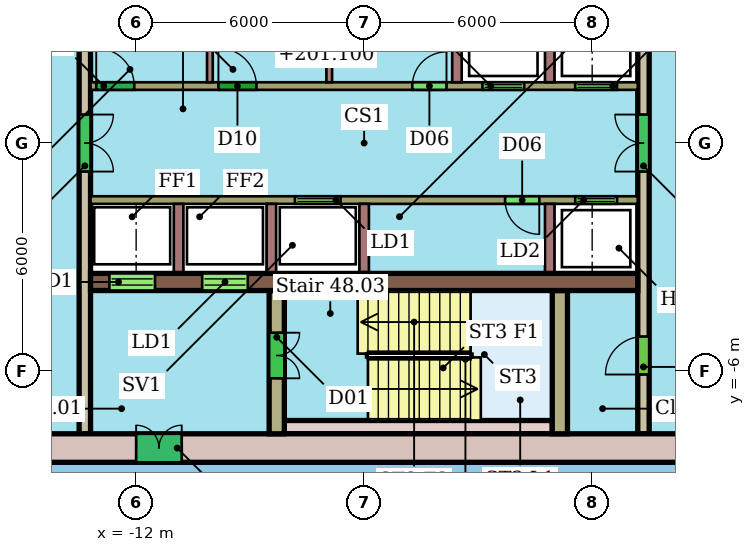
"""IFC4 building model, lengths in metres.
Left out: names, types, materials, properties, quantities, classifications, styles, units other than length and angle.
Written with IfcOpenShell. Run it as: python <this file> out.ifc"""

import sys

from ifc_helpers import new_model, si_unit, direction, frame, frame_2d, origin, place, context, subcontext, project, spatial, rectangle, extrude, element, fill, save


model = new_model("IFC4")
c1 = context("Model", 3, precision=1e-05, world=origin(), true_north=direction((0.0, 1.0)))
c2 = subcontext(c1, "Body", "Model", "MODEL_VIEW")
j1 = project(units=[si_unit("LENGTHUNIT", "METRE"), si_unit("PLANEANGLEUNIT", "RADIAN")], contexts=[c1])
p1 = place(None, origin())
s1 = spatial("IfcSite", under=j1, at=p1, CompositionType="ELEMENT")
p2 = place(p1, origin())
s2 = spatial("IfcBuilding", under=s1, at=p2, CompositionType="ELEMENT")
p3 = place(p2, frame((0.0, 0.0, 199.3)))
s3 = spatial("IfcBuildingStorey", under=s2, at=p3, CompositionType="ELEMENT", Elevation=199.3)
p4 = place(p3, frame((-16.8, -8.025, 0.0), z_axis=(0.0, 0.0, 1.0), x_axis=(1.0, 0.0, 0.0)))
e1 = element("IfcWall", 1, at=p4, inside=s3, PredefinedType="SHEAR", context=c2, shape_type="SweptSolid", body=[
    extrude(rectangle(XDim=21.6, YDim=0.75, at=frame_2d((10.8, 0.0))), origin(), (0.0, 0.0, 1.0), 3.3),
])
p5 = place(p4, frame((4.8, 0.0, 0.0)))
e2 = element("IfcOpeningElement", 2, at=p5, cuts=e1, PredefinedType="OPENING", context=c2, shape_type="SweptSolid", body=[
    extrude(rectangle(XDim=1.2, YDim=2.1, at=frame_2d((0.6, 1.05))), frame((0.0, 0.385, 0.0), z_axis=(0.0, -1.0, 0.0), x_axis=(1.0, 0.0, 0.0)), (0.0, 0.0, 1.0), 0.77),
])
p6 = place(p3, frame((-13.2, -3.655, 0.0), z_axis=(0.0, 0.0, 1.0), x_axis=(1.0, 0.0, 0.0)))
e3 = element("IfcWall", 3, at=p6, inside=s3, PredefinedType="SHEAR", context=c2, shape_type="SweptSolid", body=[
    extrude(rectangle(XDim=7.2, YDim=0.45, at=frame_2d((3.6, 0.0))), origin(), (0.0, 0.0, 1.0), 3.3),
])
p7 = place(p6, frame((0.496, 0.0, 0.0)))
e4 = element("IfcOpeningElement", 4, at=p7, cuts=e3, PredefinedType="OPENING", context=c2, shape_type="SweptSolid", body=[
    extrude(rectangle(XDim=1.2, YDim=2.1, at=frame_2d((0.6, 1.05))), frame((0.0, 0.235, 0.0), z_axis=(0.0, -1.0, 0.0), x_axis=(1.0, 0.0, 0.0)), (0.0, 0.0, 1.0), 0.47),
])
p8 = place(p6, frame((2.938, 0.0, 0.0)))
e5 = element("IfcOpeningElement", 5, at=p8, cuts=e3, PredefinedType="OPENING", context=c2, shape_type="SweptSolid", body=[
    extrude(rectangle(XDim=1.2, YDim=2.1, at=frame_2d((0.6, 1.05))), frame((0.0, 0.235, 0.0), z_axis=(0.0, -1.0, 0.0), x_axis=(1.0, 0.0, 0.0)), (0.0, 0.0, 1.0), 0.47),
])
p9 = place(p3, frame((-6.0, -3.655, 0.0), z_axis=(0.0, 0.0, 1.0), x_axis=(1.0, 0.0, 0.0)))
e6 = element("IfcWall", 6, at=p9, inside=s3, PredefinedType="SHEAR", context=c2, shape_type="SweptSolid", body=[
    extrude(rectangle(XDim=7.2, YDim=0.45, at=frame_2d((3.6, 0.0))), origin(), (0.0, 0.0, 1.0), 3.3),
])
p10 = place(p3, frame((-13.35, 7.65, 0.0), z_axis=(0.0, 0.0, 1.0), x_axis=(0.0, -1.0, 0.0)))
e7 = element("IfcWall", 7, at=p10, inside=s3, PredefinedType="SHEAR", context=c2, shape_type="SweptSolid", body=[
    extrude(rectangle(XDim=15.3, YDim=0.3, at=frame_2d((7.65, 0.0))), origin(), (0.0, 0.0, 1.0), 3.3),
])
p11 = place(p10, frame((6.9, 0.0, 0.0)))
e8 = element("IfcOpeningElement", 8, at=p11, cuts=e7, PredefinedType="OPENING", context=c2, shape_type="SweptSolid", body=[
    extrude(rectangle(XDim=1.5, YDim=2.1, at=frame_2d((0.75, 1.05))), frame((0.0, 0.16, 0.0), z_axis=(0.0, -1.0, 0.0), x_axis=(1.0, 0.0, 0.0)), (0.0, 0.0, 1.0), 0.32),
])
p12 = place(p3, frame((1.35, -7.65, 0.0), z_axis=(0.0, 0.0, 1.0), x_axis=(0.0, 1.0, 0.0)))
e9 = element("IfcWall", 9, at=p12, inside=s3, PredefinedType="SHEAR", context=c2, shape_type="SweptSolid", body=[
    extrude(rectangle(XDim=15.3, YDim=0.3, at=frame_2d((7.65, 0.0))), origin(), (0.0, 0.0, 1.0), 3.3),
])
p13 = place(p12, frame((1.56, 0.0, 0.0)))
e10 = element("IfcOpeningElement", 10, at=p13, cuts=e9, PredefinedType="OPENING", context=c2, shape_type="SweptSolid", body=[
    extrude(rectangle(XDim=1.0, YDim=2.1, at=frame_2d((0.5, 1.05))), frame((0.0, 0.16, 0.0), z_axis=(0.0, -1.0, 0.0), x_axis=(1.0, 0.0, 0.0)), (0.0, 0.0, 1.0), 0.32),
])
p14 = place(p12, frame((6.9, 0.0, 0.0)))
e11 = element("IfcOpeningElement", 11, at=p14, cuts=e9, PredefinedType="OPENING", context=c2, shape_type="SweptSolid", body=[
    extrude(rectangle(XDim=1.5, YDim=2.1, at=frame_2d((0.75, 1.05))), frame((0.0, 0.16, 0.0), z_axis=(0.0, -1.0, 0.0), x_axis=(1.0, 0.0, 0.0)), (0.0, 0.0, 1.0), 0.32),
])
p15 = place(p3, frame((-13.2, 1.5, 0.0), z_axis=(0.0, 0.0, 1.0), x_axis=(1.0, 0.0, 0.0)))
e12 = element("IfcWall", 12, at=p15, inside=s3, PredefinedType="SHEAR", context=c2, shape_type="SweptSolid", body=[
    extrude(rectangle(XDim=14.4, YDim=0.2, at=frame_2d((7.2, 0.0))), origin(), (0.0, 0.0, 1.0), 3.3),
])
p16 = place(p15, frame((10.312, 0.0, 0.0)))
e13 = element("IfcOpeningElement", 13, at=p16, cuts=e12, PredefinedType="OPENING", context=c2, shape_type="SweptSolid", body=[
    extrude(rectangle(XDim=1.1, YDim=2.1, at=frame_2d((0.55, 1.05))), frame((0.0, 0.11, 0.0), z_axis=(0.0, -1.0, 0.0), x_axis=(1.0, 0.0, 0.0)), (0.0, 0.0, 1.0), 0.22),
])
p17 = place(p15, frame((12.754, 0.0, 0.0)))
e14 = element("IfcOpeningElement", 14, at=p17, cuts=e12, PredefinedType="OPENING", context=c2, shape_type="SweptSolid", body=[
    extrude(rectangle(XDim=1.1, YDim=2.1, at=frame_2d((0.55, 1.05))), frame((0.0, 0.11, 0.0), z_axis=(0.0, -1.0, 0.0), x_axis=(1.0, 0.0, 0.0)), (0.0, 0.0, 1.0), 0.22),
])
p18 = place(p15, frame((0.15, 0.0, 0.0)))
e15 = element("IfcOpeningElement", 15, at=p18, cuts=e12, PredefinedType="OPENING", context=c2, shape_type="SweptSolid", body=[
    extrude(rectangle(XDim=1.0, YDim=2.1, at=frame_2d((0.5, 1.05))), frame((0.0, 0.11, 0.0), z_axis=(0.0, -1.0, 0.0), x_axis=(1.0, 0.0, 0.0)), (0.0, 0.0, 1.0), 0.22),
])
p19 = place(p15, frame((3.365, 0.0, 0.0)))
e16 = element("IfcOpeningElement", 16, at=p19, cuts=e12, PredefinedType="OPENING", context=c2, shape_type="SweptSolid", body=[
    extrude(rectangle(XDim=1.0, YDim=2.1, at=frame_2d((0.5, 1.05))), frame((0.0, 0.11, 0.0), z_axis=(0.0, -1.0, 0.0), x_axis=(1.0, 0.0, 0.0)), (0.0, 0.0, 1.0), 0.22),
])
p20 = place(p15, frame((8.467, 0.0, 0.0)))
e17 = element("IfcOpeningElement", 17, at=p20, cuts=e12, PredefinedType="OPENING", context=c2, shape_type="SweptSolid", body=[
    extrude(rectangle(XDim=0.9, YDim=2.1, at=frame_2d((0.45, 1.05))), frame((0.0, 0.11, 0.0), z_axis=(0.0, -1.0, 0.0), x_axis=(1.0, 0.0, 0.0)), (0.0, 0.0, 1.0), 0.22),
])
p21 = place(p3, frame((1.2, -1.5, 0.0), z_axis=(0.0, 0.0, 1.0), x_axis=(-1.0, 0.0, 0.0)))
e18 = element("IfcWall", 18, at=p21, inside=s3, PredefinedType="SHEAR", context=c2, shape_type="SweptSolid", body=[
    extrude(rectangle(XDim=14.4, YDim=0.2, at=frame_2d((7.2, 0.0))), origin(), (0.0, 0.0, 1.0), 3.3),
])
p22 = place(p21, frame((7.821, 0.0, 0.0)))
e19 = element("IfcOpeningElement", 19, at=p22, cuts=e18, PredefinedType="OPENING", context=c2, shape_type="SweptSolid", body=[
    extrude(rectangle(XDim=1.2, YDim=2.1, at=frame_2d((0.6, 1.05))), frame((0.0, 0.11, 0.0), z_axis=(0.0, -1.0, 0.0), x_axis=(1.0, 0.0, 0.0)), (0.0, 0.0, 1.0), 0.22),
])
p23 = place(p21, frame((0.546, 0.0, 0.0)))
e20 = element("IfcOpeningElement", 20, at=p23, cuts=e18, PredefinedType="OPENING", context=c2, shape_type="SweptSolid", body=[
    extrude(rectangle(XDim=1.1, YDim=2.1, at=frame_2d((0.55, 1.05))), frame((0.0, 0.11, 0.0), z_axis=(0.0, -1.0, 0.0), x_axis=(1.0, 0.0, 0.0)), (0.0, 0.0, 1.0), 0.22),
])
p24 = place(p21, frame((2.592, 0.0, 0.0)))
e21 = element("IfcOpeningElement", 21, at=p24, cuts=e18, PredefinedType="OPENING", context=c2, shape_type="SweptSolid", body=[
    extrude(rectangle(XDim=0.9, YDim=2.1, at=frame_2d((0.45, 1.05))), frame((0.0, 0.11, 0.0), z_axis=(0.0, -1.0, 0.0), x_axis=(1.0, 0.0, 0.0)), (0.0, 0.0, 1.0), 0.22),
])
p25 = place(p3, frame((-8.3, -3.88, 0.0), z_axis=(0.0, 0.0, 1.0), x_axis=(0.0, -1.0, 0.0)))
e22 = element("IfcWall", 22, at=p25, inside=s3, PredefinedType="SHEAR", context=c2, shape_type="SweptSolid", body=[
    extrude(rectangle(XDim=3.77, YDim=0.4, at=frame_2d((1.885, 0.0))), origin(), (0.0, 0.0, 1.0), 3.3),
])
p26 = place(p25, frame((1.11, 0.0, 0.0)))
e23 = element("IfcOpeningElement", 23, at=p26, cuts=e22, PredefinedType="OPENING", context=c2, shape_type="SweptSolid", body=[
    extrude(rectangle(XDim=1.2, YDim=2.1, at=frame_2d((0.6, 1.05))), frame((0.0, 0.21, 0.0), z_axis=(0.0, -1.0, 0.0), x_axis=(1.0, 0.0, 0.0)), (0.0, 0.0, 1.0), 0.42),
])
p27 = place(p3, frame((-0.85, -3.88, 0.0), z_axis=(0.0, 0.0, 1.0), x_axis=(0.0, -1.0, 0.0)))
e24 = element("IfcWall", 24, at=p27, inside=s3, PredefinedType="SHEAR", context=c2, shape_type="SweptSolid", body=[
    extrude(rectangle(XDim=3.77, YDim=0.4, at=frame_2d((1.885, 0.0))), origin(), (0.0, 0.0, 1.0), 3.3),
])
p28 = place(p3, frame((-8.1, -7.475, 0.0), z_axis=(0.0, 0.0, 1.0), x_axis=(1.0, 0.0, 0.0)))
e25 = element("IfcWall", 25, at=p28, inside=s3, PredefinedType="SHEAR", context=c2, shape_type="SweptSolid", body=[
    extrude(rectangle(XDim=7.05, YDim=0.35, at=frame_2d((3.525, 0.0))), origin(), (0.0, 0.0, 1.0), 3.3),
])
for number, where, z_axis, x_axis in (
    (26, (-3.558, 1.6, 0.0), (0.0, 0.0, 1.0), (0.0, 1.0, 0.0)),
    (27, (-1.117, 1.6, 0.0), (0.0, 0.0, 1.0), (0.0, 1.0, 0.0)),
):
    element("IfcWall", number, at=place(p3, frame(where, z_axis=z_axis, x_axis=x_axis)), inside=s3, PredefinedType="SHEAR", context=c2, shape_type="SweptSolid", body=[
        extrude(rectangle(XDim=1.83, YDim=0.25, at=frame_2d((0.915, 0.0))), origin(), (0.0, 0.0, 1.0), 3.3),
    ])
for number, where, z_axis, x_axis in (
    (28, (-10.06, 1.6, 0.0), (0.0, 0.0, 1.0), (0.0, 1.0, 0.0)),
    (29, (-6.919, 1.6, 0.0), (0.0, 0.0, 1.0), (0.0, 1.0, 0.0)),
):
    element("IfcWall", number, at=place(p3, frame(where, z_axis=z_axis, x_axis=x_axis)), inside=s3, PredefinedType="PARTITIONING", context=c2, shape_type="SweptSolid", body=[
        extrude(rectangle(XDim=1.83, YDim=0.15, at=frame_2d((0.915, 0.0))), origin(), (0.0, 0.0, 1.0), 3.3),
    ])
for number, where, z_axis, x_axis in (
    (30, (-10.883, -1.6, 0.0), (0.0, 0.0, 1.0), (0.0, -1.0, 0.0)),
    (31, (-8.442, -1.6, 0.0), (0.0, 0.0, 1.0), (0.0, -1.0, 0.0)),
    (32, (-6.0, -1.6, 0.0), (0.0, 0.0, 1.0), (0.0, -1.0, 0.0)),
    (33, (-1.117, -1.6, 0.0), (0.0, 0.0, 1.0), (0.0, -1.0, 0.0)),
):
    element("IfcWall", number, at=place(p3, frame(where, z_axis=z_axis, x_axis=x_axis)), inside=s3, PredefinedType="SHEAR", context=c2, shape_type="SweptSolid", body=[
        extrude(rectangle(XDim=1.83, YDim=0.25, at=frame_2d((0.915, 0.0))), origin(), (0.0, 0.0, 1.0), 3.3),
    ])
p29 = place(p5, origin())
e34 = element("IfcDoor", 34, at=p29, inside=s3, OperationType="DOUBLE_DOOR_SINGLE_SWING", PredefinedType="NOTDEFINED", context=c2, shape_type="SweptSolid", body=[
    extrude(rectangle(XDim=1.2, YDim=2.1, at=frame_2d((0.6, 1.05))), frame((0.0, 0.025, 0.0), z_axis=(0.0, -1.0, 0.0), x_axis=(1.0, 0.0, 0.0)), (0.0, 0.0, 1.0), 0.05),
])
fill(e2, e34)
p30 = place(p7, origin())
e35 = element("IfcDoor", 35, at=p30, inside=s3, OperationType="DOUBLE_DOOR_SLIDING", PredefinedType="NOTDEFINED", context=c2, shape_type="SweptSolid", body=[
    extrude(rectangle(XDim=1.2, YDim=2.1, at=frame_2d((0.6, 1.05))), frame((0.0, 0.025, 0.0), z_axis=(0.0, -1.0, 0.0), x_axis=(1.0, 0.0, 0.0)), (0.0, 0.0, 1.0), 0.05),
])
fill(e4, e35)
p31 = place(p8, origin())
e36 = element("IfcDoor", 36, at=p31, inside=s3, OperationType="DOUBLE_DOOR_SLIDING", PredefinedType="NOTDEFINED", context=c2, shape_type="SweptSolid", body=[
    extrude(rectangle(XDim=1.2, YDim=2.1, at=frame_2d((0.6, 1.05))), frame((0.0, 0.025, 0.0), z_axis=(0.0, -1.0, 0.0), x_axis=(1.0, 0.0, 0.0)), (0.0, 0.0, 1.0), 0.05),
])
fill(e5, e36)
p32 = place(p11, origin())
e37 = element("IfcDoor", 37, at=p32, inside=s3, OperationType="DOUBLE_DOOR_SINGLE_SWING", PredefinedType="NOTDEFINED", context=c2, shape_type="SweptSolid", body=[
    extrude(rectangle(XDim=1.5, YDim=2.1, at=frame_2d((0.75, 1.05))), frame((0.0, 0.025, 0.0), z_axis=(0.0, -1.0, 0.0), x_axis=(1.0, 0.0, 0.0)), (0.0, 0.0, 1.0), 0.05),
])
fill(e8, e37)
p33 = place(p13, origin())
e38 = element("IfcDoor", 38, at=p33, inside=s3, OperationType="SINGLE_SWING_LEFT", PredefinedType="NOTDEFINED", context=c2, shape_type="SweptSolid", body=[
    extrude(rectangle(XDim=1.0, YDim=2.1, at=frame_2d((0.5, 1.05))), frame((0.0, 0.025, 0.0), z_axis=(0.0, -1.0, 0.0), x_axis=(1.0, 0.0, 0.0)), (0.0, 0.0, 1.0), 0.05),
])
fill(e10, e38)
p34 = place(p14, origin())
e39 = element("IfcDoor", 39, at=p34, inside=s3, OperationType="DOUBLE_DOOR_SINGLE_SWING", PredefinedType="NOTDEFINED", context=c2, shape_type="SweptSolid", body=[
    extrude(rectangle(XDim=1.5, YDim=2.1, at=frame_2d((0.75, 1.05))), frame((0.0, 0.025, 0.0), z_axis=(0.0, -1.0, 0.0), x_axis=(1.0, 0.0, 0.0)), (0.0, 0.0, 1.0), 0.05),
])
fill(e11, e39)
p35 = place(p16, origin())
e40 = element("IfcDoor", 40, at=p35, inside=s3, OperationType="DOUBLE_DOOR_SLIDING", PredefinedType="NOTDEFINED", context=c2, shape_type="SweptSolid", body=[
    extrude(rectangle(XDim=1.1, YDim=2.1, at=frame_2d((0.55, 1.05))), frame((0.0, 0.025, 0.0), z_axis=(0.0, -1.0, 0.0), x_axis=(1.0, 0.0, 0.0)), (0.0, 0.0, 1.0), 0.05),
])
fill(e13, e40)
p36 = place(p17, origin())
e41 = element("IfcDoor", 41, at=p36, inside=s3, OperationType="DOUBLE_DOOR_SLIDING", PredefinedType="NOTDEFINED", context=c2, shape_type="SweptSolid", body=[
    extrude(rectangle(XDim=1.1, YDim=2.1, at=frame_2d((0.55, 1.05))), frame((0.0, 0.025, 0.0), z_axis=(0.0, -1.0, 0.0), x_axis=(1.0, 0.0, 0.0)), (0.0, 0.0, 1.0), 0.05),
])
fill(e14, e41)
p37 = place(p18, origin())
e42 = element("IfcDoor", 42, at=p37, inside=s3, OperationType="SINGLE_SWING_LEFT", PredefinedType="NOTDEFINED", context=c2, shape_type="SweptSolid", body=[
    extrude(rectangle(XDim=1.0, YDim=2.1, at=frame_2d((0.5, 1.05))), frame((0.0, 0.025, 0.0), z_axis=(0.0, -1.0, 0.0), x_axis=(1.0, 0.0, 0.0)), (0.0, 0.0, 1.0), 0.05),
])
fill(e15, e42)
p38 = place(p19, origin())
e43 = element("IfcDoor", 43, at=p38, inside=s3, OperationType="SINGLE_SWING_LEFT", PredefinedType="NOTDEFINED", context=c2, shape_type="SweptSolid", body=[
    extrude(rectangle(XDim=1.0, YDim=2.1, at=frame_2d((0.5, 1.05))), frame((0.0, 0.025, 0.0), z_axis=(0.0, -1.0, 0.0), x_axis=(1.0, 0.0, 0.0)), (0.0, 0.0, 1.0), 0.05),
])
fill(e16, e43)
p39 = place(p20, origin())
e44 = element("IfcDoor", 44, at=p39, inside=s3, OperationType="SINGLE_SWING_RIGHT", PredefinedType="NOTDEFINED", context=c2, shape_type="SweptSolid", body=[
    extrude(rectangle(XDim=0.9, YDim=2.1, at=frame_2d((0.45, 1.05))), frame((0.0, 0.025, 0.0), z_axis=(0.0, -1.0, 0.0), x_axis=(1.0, 0.0, 0.0)), (0.0, 0.0, 1.0), 0.05),
])
fill(e17, e44)
p40 = place(p22, origin())
e45 = element("IfcDoor", 45, at=p40, inside=s3, OperationType="DOUBLE_DOOR_SLIDING", PredefinedType="NOTDEFINED", context=c2, shape_type="SweptSolid", body=[
    extrude(rectangle(XDim=1.2, YDim=2.1, at=frame_2d((0.6, 1.05))), frame((0.0, 0.025, 0.0), z_axis=(0.0, -1.0, 0.0), x_axis=(1.0, 0.0, 0.0)), (0.0, 0.0, 1.0), 0.05),
])
fill(e19, e45)
p41 = place(p23, origin())
e46 = element("IfcDoor", 46, at=p41, inside=s3, OperationType="DOUBLE_DOOR_SLIDING", PredefinedType="NOTDEFINED", context=c2, shape_type="SweptSolid", body=[
    extrude(rectangle(XDim=1.1, YDim=2.1, at=frame_2d((0.55, 1.05))), frame((0.0, 0.025, 0.0), z_axis=(0.0, -1.0, 0.0), x_axis=(1.0, 0.0, 0.0)), (0.0, 0.0, 1.0), 0.05),
])
fill(e20, e46)
p42 = place(p24, origin())
e47 = element("IfcDoor", 47, at=p42, inside=s3, OperationType="SINGLE_SWING_LEFT", PredefinedType="NOTDEFINED", context=c2, shape_type="SweptSolid", body=[
    extrude(rectangle(XDim=0.9, YDim=2.1, at=frame_2d((0.45, 1.05))), frame((0.0, 0.025, 0.0), z_axis=(0.0, -1.0, 0.0), x_axis=(1.0, 0.0, 0.0)), (0.0, 0.0, 1.0), 0.05),
])
fill(e21, e47)
p43 = place(p26, origin())
e48 = element("IfcDoor", 48, at=p43, inside=s3, OperationType="DOUBLE_DOOR_SINGLE_SWING", PredefinedType="NOTDEFINED", context=c2, shape_type="SweptSolid", body=[
    extrude(rectangle(XDim=1.2, YDim=2.1, at=frame_2d((0.6, 1.05))), frame((0.0, 0.025, 0.0), z_axis=(0.0, -1.0, 0.0), x_axis=(1.0, 0.0, 0.0)), (0.0, 0.0, 1.0), 0.05),
])
fill(e23, e48)
save(model, sys.argv[1])
